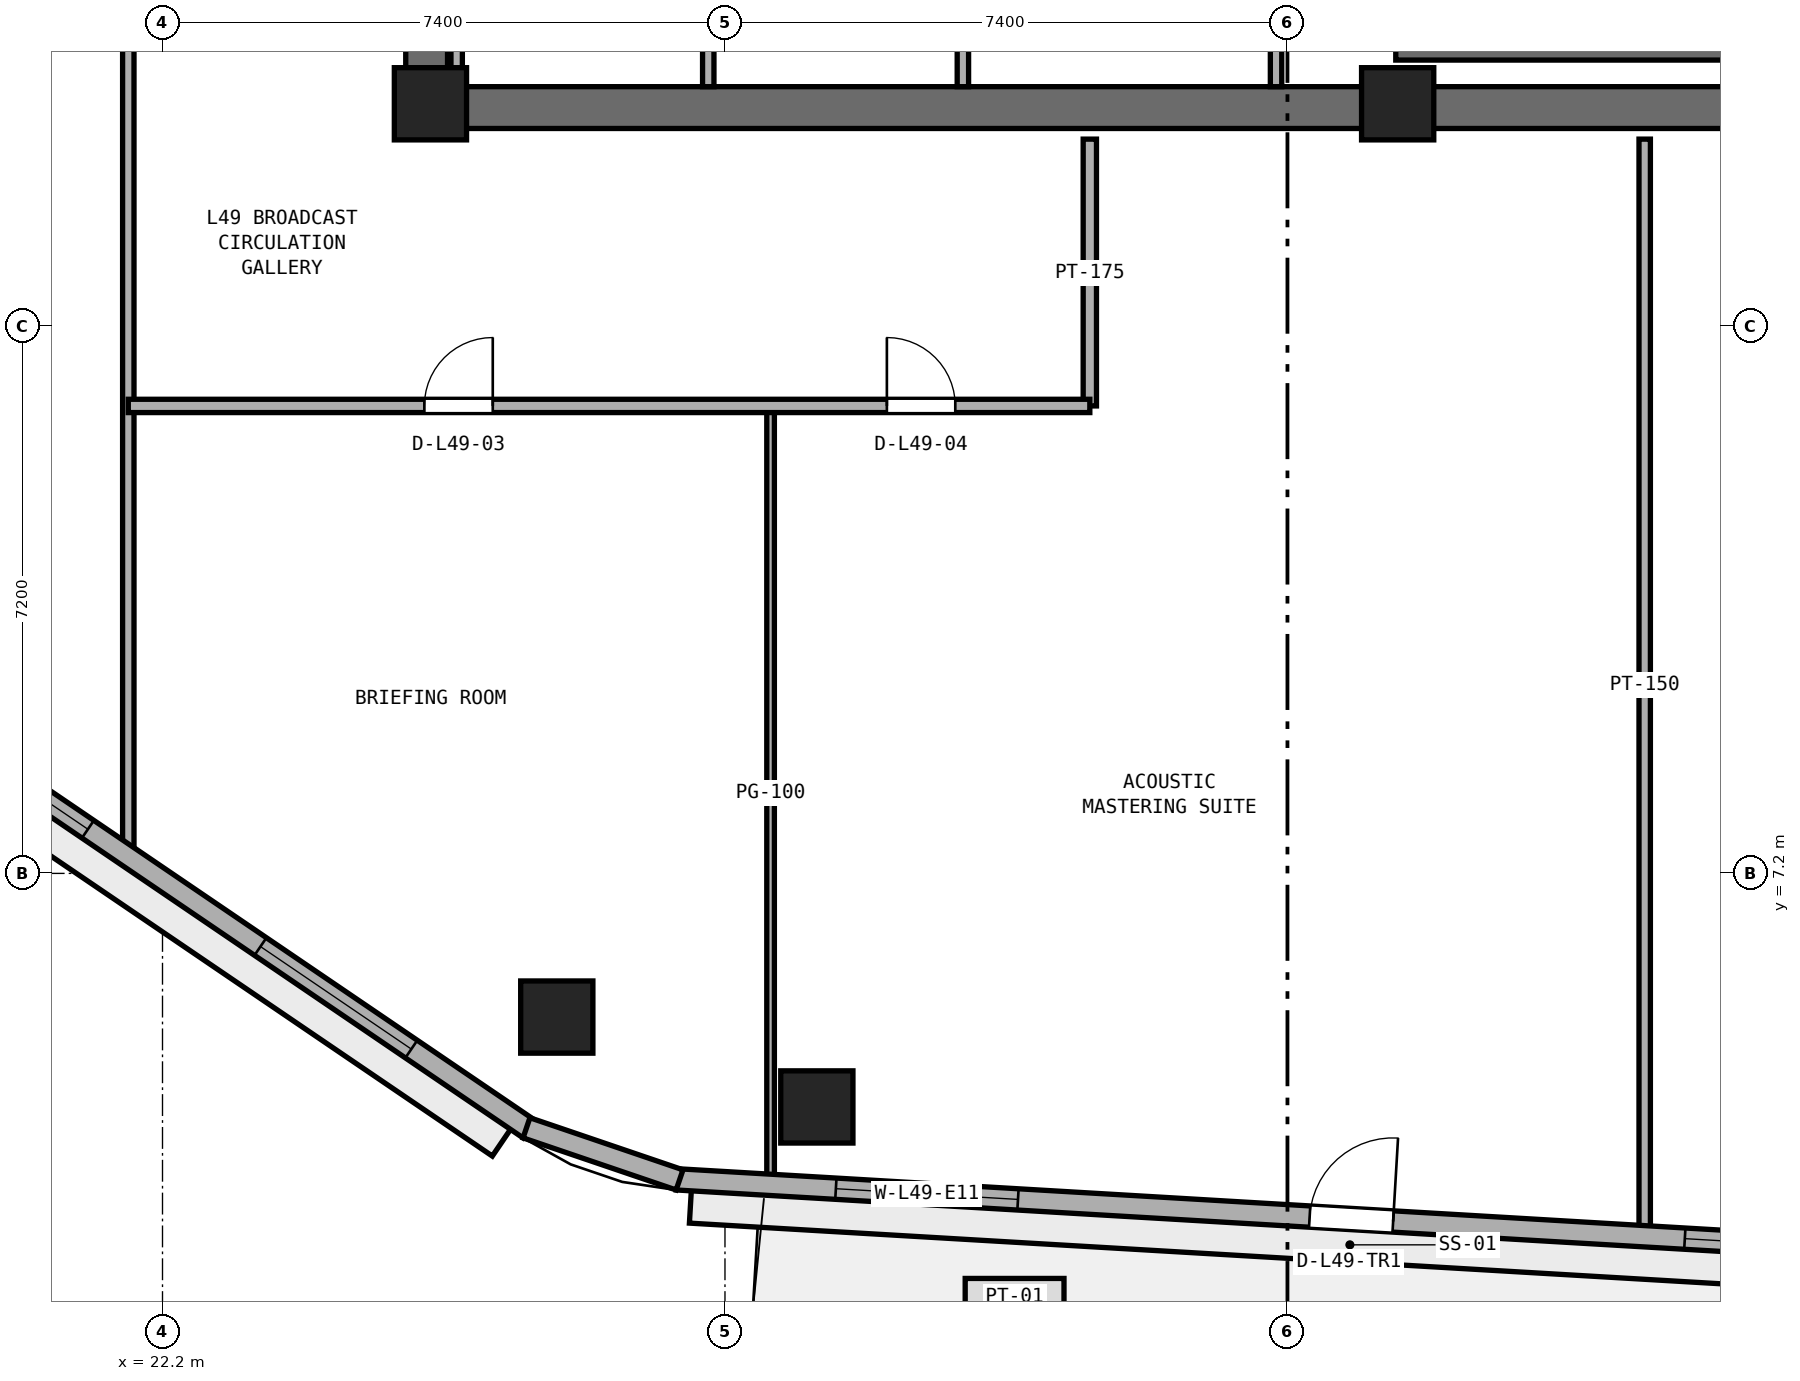
"""IFC4 building model, lengths in metres.
Left out: names, types, materials, properties, quantities, classifications, styles, units other than length and angle.
Written with IfcOpenShell. Run it as: python <this file> out.ifc"""

import sys

from ifc_helpers import new_model, si_unit, direction, frame, frame_2d, origin, origin_2d, place, context, subcontext, project, spatial, rectangle, extrude, element, fill, save


model = new_model("IFC4")
c1 = context("Model", 3, precision=1e-05, world=origin(), true_north=direction((0.0, 1.0)))
c2 = subcontext(c1, "Body", "Model", "MODEL_VIEW")
j1 = project(units=[si_unit("LENGTHUNIT", "METRE"), si_unit("PLANEANGLEUNIT", "RADIAN")], contexts=[c1])
p1 = place(None, origin())
s1 = spatial("IfcSite", under=j1, at=p1, CompositionType="ELEMENT")
p2 = place(p1, origin())
s2 = spatial("IfcBuilding", under=s1, at=p2, CompositionType="ELEMENT")
p3 = place(p2, frame((0.0, 0.0, 193.4)))
s3 = spatial("IfcBuildingStorey", under=s2, at=p3, CompositionType="ELEMENT", Elevation=193.4)
p4 = place(p3, frame((25.4, 17.275, 0.0), z_axis=(0.0, 0.0, 1.0), x_axis=(1.0, 0.0, 0.0)))
e1 = element("IfcWall", 1, at=p4, inside=s3, PredefinedType="SHEAR", context=c2, shape_type="SweptSolid", body=[
    extrude(rectangle(XDim=23.2, YDim=0.55, at=frame_2d((11.6, 0.0))), origin(), (0.0, 0.0, 1.0), 3.54),
])
p5 = place(p3, frame((25.675, 17.55, 0.0), z_axis=(0.0, 0.0, 1.0), x_axis=(0.0, 1.0, 0.0)))
e2 = element("IfcWall", 2, at=p5, inside=s3, PredefinedType="SHEAR", context=c2, shape_type="SweptSolid", body=[
    extrude(rectangle(XDim=15.3, YDim=0.55, at=frame_2d((7.65, 0.0))), origin(), (0.0, 0.0, 1.0), 3.54),
])
p6 = place(p5, frame((6.9, 0.0, 0.0)))
e3 = element("IfcOpeningElement", 3, at=p6, cuts=e2, PredefinedType="OPENING", context=c2, shape_type="SweptSolid", body=[
    extrude(rectangle(XDim=1.5, YDim=2.15, at=frame_2d((0.75, 1.075))), frame((0.0, 0.285, 0.0), z_axis=(0.0, -1.0, 0.0), x_axis=(1.0, 0.0, 0.0)), (0.0, 0.0, 1.0), 0.57),
])
for number, where, z_axis, x_axis in (
    (4, (25.725, 17.325, 0.0), (0.0, 0.0, 1.0), (1.0, 0.0, 0.0)),
    (5, (38.45, 17.325, 0.0), (0.0, 0.0, 1.0), (1.0, 0.0, 0.0)),
):
    element("IfcColumn", number, at=place(p3, frame(where, z_axis=z_axis, x_axis=x_axis)), inside=s3, PredefinedType="PILASTER", context=c2, shape_type="SweptSolid", body=[
        extrude(rectangle(XDim=0.95, YDim=0.95, at=origin_2d()), origin(), (0.0, 0.0, 1.0), 3.8),
    ])
for number, where, z_axis, x_axis in (
    (6, (30.809, 4.127, 0.0), (0.0, 0.0, 1.0), (1.0, 0.0, 0.0)),
    (7, (27.387, 5.31, 0.0), (0.0, 0.0, 1.0), (1.0, 0.0, 0.0)),
):
    element("IfcColumn", number, at=place(p3, frame(where, z_axis=z_axis, x_axis=x_axis)), inside=s3, PredefinedType="COLUMN", context=c2, shape_type="SweptSolid", body=[
        extrude(rectangle(XDim=0.95, YDim=0.95, at=origin_2d()), origin(), (0.0, 0.0, 1.0), 3.8),
    ])
p7 = place(p3, frame((38.425, 18.025, 0.0), z_axis=(0.0, 0.0, 1.0), x_axis=(1.0, 0.0, 0.0)))
e8 = element("IfcWall", 8, at=p7, inside=s3, PredefinedType="SHEAR", context=c2, shape_type="SweptSolid", body=[
    extrude(rectangle(XDim=7.3, YDim=0.25, at=frame_2d((3.65, 0.0))), origin(), (0.0, 0.0, 1.0), 3.54),
])
p8 = place(p3, frame((26.07, 17.55, 0.0), z_axis=(0.0, 0.0, 1.0), x_axis=(0.0, 1.0, 0.0)))
e9 = element("IfcWall", 9, at=p8, inside=s3, PredefinedType="PARTITIONING", context=c2, shape_type="SweptSolid", body=[
    extrude(rectangle(XDim=2.2, YDim=0.15, at=frame_2d((1.1, 0.0))), origin(), (0.0, 0.0, 1.0), 2.64),
])
for number, where, z_axis, x_axis in (
    (10, (29.38, 17.55, 0.0), (0.0, 0.0, 1.0), (0.0, 1.0, 0.0)),
    (11, (32.73, 17.55, 0.0), (0.0, 0.0, 1.0), (0.0, 1.0, 0.0)),
    (12, (36.85, 17.55, 0.0), (0.0, 0.0, 1.0), (0.0, 1.0, 0.0)),
):
    element("IfcWall", number, at=place(p3, frame(where, z_axis=z_axis, x_axis=x_axis)), inside=s3, PredefinedType="PARTITIONING", context=c2, shape_type="SweptSolid", body=[
        extrude(rectangle(XDim=2.2, YDim=0.15, at=frame_2d((1.1, 0.0))), origin(), (0.0, 0.0, 1.0), 3.54),
    ])
p9 = place(p3, frame((41.7, 2.49, 0.0), z_axis=(0.0, 0.0, 1.0), x_axis=(0.0, 1.0, 0.0)))
e13 = element("IfcWall", 13, at=p9, inside=s3, PredefinedType="PARTITIONING", context=c2, shape_type="SweptSolid", body=[
    extrude(rectangle(XDim=14.37, YDim=0.15, at=frame_2d((7.185, 0.0))), origin(), (0.0, 0.0, 1.0), 3.54),
])
p10 = place(p3, frame((34.4, 13.35, 0.0), z_axis=(0.0, 0.0, 1.0), x_axis=(0.0, 1.0, 0.0)))
e14 = element("IfcWall", 14, at=p10, inside=s3, PredefinedType="PARTITIONING", context=c2, shape_type="SweptSolid", body=[
    extrude(rectangle(XDim=3.51, YDim=0.175, at=frame_2d((1.755, 0.0))), origin(), (0.0, 0.0, 1.0), 3.54),
])
p11 = place(p3, frame((30.2, 3.167, 0.0), z_axis=(0.0, 0.0, 1.0), x_axis=(0.0, 1.0, 0.0)))
e15 = element("IfcWall", 15, at=p11, inside=s3, PredefinedType="PARTITIONING", context=c2, shape_type="SweptSolid", body=[
    extrude(rectangle(XDim=10.183, YDim=0.1, at=frame_2d((5.092, 0.0))), origin(), (0.0, 0.0, 1.0), 3.54),
])
p12 = place(p3, frame((21.75, 7.39, 0.0), z_axis=(0.0, 0.0, 1.0), x_axis=(0.0, 1.0, 0.0)))
e16 = element("IfcWall", 16, at=p12, inside=s3, PredefinedType="PARTITIONING", context=c2, shape_type="SweptSolid", body=[
    extrude(rectangle(XDim=16.46, YDim=0.15, at=frame_2d((8.23, 0.0))), origin(), (0.0, 0.0, 1.0), 3.54),
])
p13 = place(p12, frame((10.639, 0.0, 0.0)))
e17 = element("IfcOpeningElement", 17, at=p13, cuts=e16, PredefinedType="OPENING", context=c2, shape_type="SweptSolid", body=[
    extrude(rectangle(XDim=0.9, YDim=2.1, at=frame_2d((0.45, 1.05))), frame((0.0, 0.085, 0.0), z_axis=(0.0, -1.0, 0.0), x_axis=(1.0, 0.0, 0.0)), (0.0, 0.0, 1.0), 0.17),
])
p14 = place(p3, frame((21.75, 13.35, 0.0), z_axis=(0.0, 0.0, 1.0), x_axis=(1.0, 0.0, 0.0)))
e18 = element("IfcWall", 18, at=p14, inside=s3, PredefinedType="PARTITIONING", context=c2, shape_type="SweptSolid", body=[
    extrude(rectangle(XDim=12.65, YDim=0.175, at=frame_2d((6.325, 0.0))), origin(), (0.0, 0.0, 1.0), 3.54),
])
p15 = place(p14, frame((3.895, 0.0, 0.0)))
e19 = element("IfcOpeningElement", 19, at=p15, cuts=e18, PredefinedType="OPENING", context=c2, shape_type="SweptSolid", body=[
    extrude(rectangle(XDim=0.9, YDim=2.1, at=frame_2d((0.45, 1.05))), frame((0.0, 0.097, 0.0), z_axis=(0.0, -1.0, 0.0), x_axis=(1.0, 0.0, 0.0)), (0.0, 0.0, 1.0), 0.195),
])
p16 = place(p14, frame((9.98, 0.0, 0.0)))
e20 = element("IfcOpeningElement", 20, at=p16, cuts=e18, PredefinedType="OPENING", context=c2, shape_type="SweptSolid", body=[
    extrude(rectangle(XDim=0.9, YDim=2.1, at=frame_2d((0.45, 1.05))), frame((0.0, 0.097, 0.0), z_axis=(0.0, -1.0, 0.0), x_axis=(1.0, 0.0, 0.0)), (0.0, 0.0, 1.0), 0.195),
])
p17 = place(p3, frame((28.966, 3.175, 0.0), z_axis=(0.0, 0.0, 1.0), x_axis=(0.998274467859, -0.058720412304, 0.0)))
e21 = element("IfcWall", 21, at=p17, inside=s3, PredefinedType="STANDARD", context=c2, shape_type="SweptSolid", body=[
    extrude(rectangle(XDim=17.782, YDim=0.28, at=frame_2d((8.891, 0.0))), origin(), (0.0, 0.0, 1.0), 3.54),
])
p18 = place(p17, frame((8.341, 0.0, 0.0)))
e22 = element("IfcOpeningElement", 22, at=p18, cuts=e21, PredefinedType="OPENING", context=c2, shape_type="SweptSolid", body=[
    extrude(rectangle(XDim=1.1, YDim=2.2, at=frame_2d((0.55, 1.1))), frame((0.0, 0.15, 0.0), z_axis=(0.0, -1.0, 0.0), x_axis=(1.0, 0.0, 0.0)), (0.0, 0.0, 1.0), 0.3),
])
p19 = place(p17, frame((2.097, 0.0, 0.9)))
e23 = element("IfcOpeningElement", 23, at=p19, cuts=e21, PredefinedType="OPENING", context=c2, shape_type="SweptSolid", body=[
    extrude(rectangle(XDim=2.4, YDim=1.75, at=frame_2d((1.2, 0.875))), frame((0.0, 0.15, 0.0), z_axis=(0.0, -1.0, 0.0), x_axis=(1.0, 0.0, 0.0)), (0.0, 0.0, 1.0), 0.3),
])
p20 = place(p17, frame((13.285, 0.0, 0.9)))
e24 = element("IfcOpeningElement", 24, at=p20, cuts=e21, PredefinedType="OPENING", context=c2, shape_type="SweptSolid", body=[
    extrude(rectangle(XDim=2.4, YDim=1.75, at=frame_2d((1.2, 0.875))), frame((0.0, 0.15, 0.0), z_axis=(0.0, -1.0, 0.0), x_axis=(1.0, 0.0, 0.0)), (0.0, 0.0, 1.0), 0.3),
])
p21 = place(p3, frame((13.43, 13.075, 0.0), z_axis=(0.0, 0.0, 1.0), x_axis=(0.827025402003, -0.562164552815, 0.0)))
e25 = element("IfcWall", 25, at=p21, inside=s3, PredefinedType="STANDARD", context=c2, shape_type="SweptSolid", body=[
    extrude(rectangle(XDim=16.435, YDim=0.28, at=frame_2d((8.218, 0.0))), origin(), (0.0, 0.0, 1.0), 3.54),
])
p22 = place(p21, frame((1.873, 0.0, 0.9)))
e26 = element("IfcOpeningElement", 26, at=p22, cuts=e25, PredefinedType="OPENING", context=c2, shape_type="SweptSolid", body=[
    extrude(rectangle(XDim=2.4, YDim=1.75, at=frame_2d((1.2, 0.875))), frame((0.0, 0.15, 0.0), z_axis=(0.0, -1.0, 0.0), x_axis=(1.0, 0.0, 0.0)), (0.0, 0.0, 1.0), 0.3),
])
p23 = place(p21, frame((7.018, 0.0, 0.9)))
e27 = element("IfcOpeningElement", 27, at=p23, cuts=e25, PredefinedType="OPENING", context=c2, shape_type="SweptSolid", body=[
    extrude(rectangle(XDim=2.4, YDim=1.75, at=frame_2d((1.2, 0.875))), frame((0.0, 0.15, 0.0), z_axis=(0.0, -1.0, 0.0), x_axis=(1.0, 0.0, 0.0)), (0.0, 0.0, 1.0), 0.3),
])
p24 = place(p21, frame((12.163, 0.0, 0.9)))
e28 = element("IfcOpeningElement", 28, at=p24, cuts=e25, PredefinedType="OPENING", context=c2, shape_type="SweptSolid", body=[
    extrude(rectangle(XDim=2.4, YDim=1.75, at=frame_2d((1.2, 0.875))), frame((0.0, 0.15, 0.0), z_axis=(0.0, -1.0, 0.0), x_axis=(1.0, 0.0, 0.0)), (0.0, 0.0, 1.0), 0.3),
])
p25 = place(p3, frame((26.989, 3.853, 0.0), z_axis=(0.0, 0.0, 1.0), x_axis=(0.946713959835, -0.322075578479, 0.0)))
e29 = element("IfcWall", 29, at=p25, inside=s3, PredefinedType="STANDARD", context=c2, shape_type="SweptSolid", body=[
    extrude(rectangle(XDim=2.127, YDim=0.28, at=frame_2d((1.063, 0.0))), origin(), (0.0, 0.0, 1.0), 3.54),
])
p26 = place(p15, origin())
e30 = element("IfcDoor", 30, at=p26, inside=s3, OperationType="SINGLE_SWING_RIGHT", PredefinedType="DOOR", context=c2, shape_type="SweptSolid", body=[
    extrude(rectangle(XDim=0.9, YDim=2.1, at=frame_2d((0.45, 1.05))), frame((0.0, 0.025, 0.0), z_axis=(0.0, -1.0, 0.0), x_axis=(1.0, 0.0, 0.0)), (0.0, 0.0, 1.0), 0.05),
])
fill(e19, e30)
p27 = place(p16, origin())
e31 = element("IfcDoor", 31, at=p27, inside=s3, OperationType="SINGLE_SWING_LEFT", PredefinedType="DOOR", context=c2, shape_type="SweptSolid", body=[
    extrude(rectangle(XDim=0.9, YDim=2.1, at=frame_2d((0.45, 1.05))), frame((0.0, 0.025, 0.0), z_axis=(0.0, -1.0, 0.0), x_axis=(1.0, 0.0, 0.0)), (0.0, 0.0, 1.0), 0.05),
])
fill(e20, e31)
p28 = place(p18, origin())
e32 = element("IfcDoor", 32, at=p28, inside=s3, OperationType="SINGLE_SWING_RIGHT", PredefinedType="DOOR", context=c2, shape_type="SweptSolid", body=[
    extrude(rectangle(XDim=1.1, YDim=2.2, at=frame_2d((0.55, 1.1))), frame((0.0, 0.025, 0.0), z_axis=(0.0, -1.0, 0.0), x_axis=(1.0, 0.0, 0.0)), (0.0, 0.0, 1.0), 0.05),
])
fill(e22, e32)
p29 = place(p19, origin())
e33 = element("IfcWindow", 33, at=p29, inside=s3, PartitioningType="SINGLE_PANEL", PredefinedType="WINDOW", context=c2, shape_type="SweptSolid", body=[
    extrude(rectangle(XDim=2.4, YDim=1.75, at=frame_2d((1.2, 0.875))), frame((0.0, 0.03, 0.0), z_axis=(0.0, -1.0, 0.0), x_axis=(1.0, 0.0, 0.0)), (0.0, 0.0, 1.0), 0.06),
])
fill(e23, e33)
p30 = place(p20, origin())
e34 = element("IfcWindow", 34, at=p30, inside=s3, PartitioningType="SINGLE_PANEL", PredefinedType="WINDOW", context=c2, shape_type="SweptSolid", body=[
    extrude(rectangle(XDim=2.4, YDim=1.75, at=frame_2d((1.2, 0.875))), frame((0.0, 0.03, 0.0), z_axis=(0.0, -1.0, 0.0), x_axis=(1.0, 0.0, 0.0)), (0.0, 0.0, 1.0), 0.06),
])
fill(e24, e34)
p31 = place(p23, origin())
e35 = element("IfcWindow", 35, at=p31, inside=s3, PartitioningType="SINGLE_PANEL", PredefinedType="WINDOW", context=c2, shape_type="SweptSolid", body=[
    extrude(rectangle(XDim=2.4, YDim=1.75, at=frame_2d((1.2, 0.875))), frame((0.0, 0.03, 0.0), z_axis=(0.0, -1.0, 0.0), x_axis=(1.0, 0.0, 0.0)), (0.0, 0.0, 1.0), 0.06),
])
fill(e27, e35)
p32 = place(p24, origin())
e36 = element("IfcWindow", 36, at=p32, inside=s3, PartitioningType="SINGLE_PANEL", PredefinedType="WINDOW", context=c2, shape_type="SweptSolid", body=[
    extrude(rectangle(XDim=2.4, YDim=1.75, at=frame_2d((1.2, 0.875))), frame((0.0, 0.03, 0.0), z_axis=(0.0, -1.0, 0.0), x_axis=(1.0, 0.0, 0.0)), (0.0, 0.0, 1.0), 0.06),
])
fill(e28, e36)
save(model, sys.argv[1])
